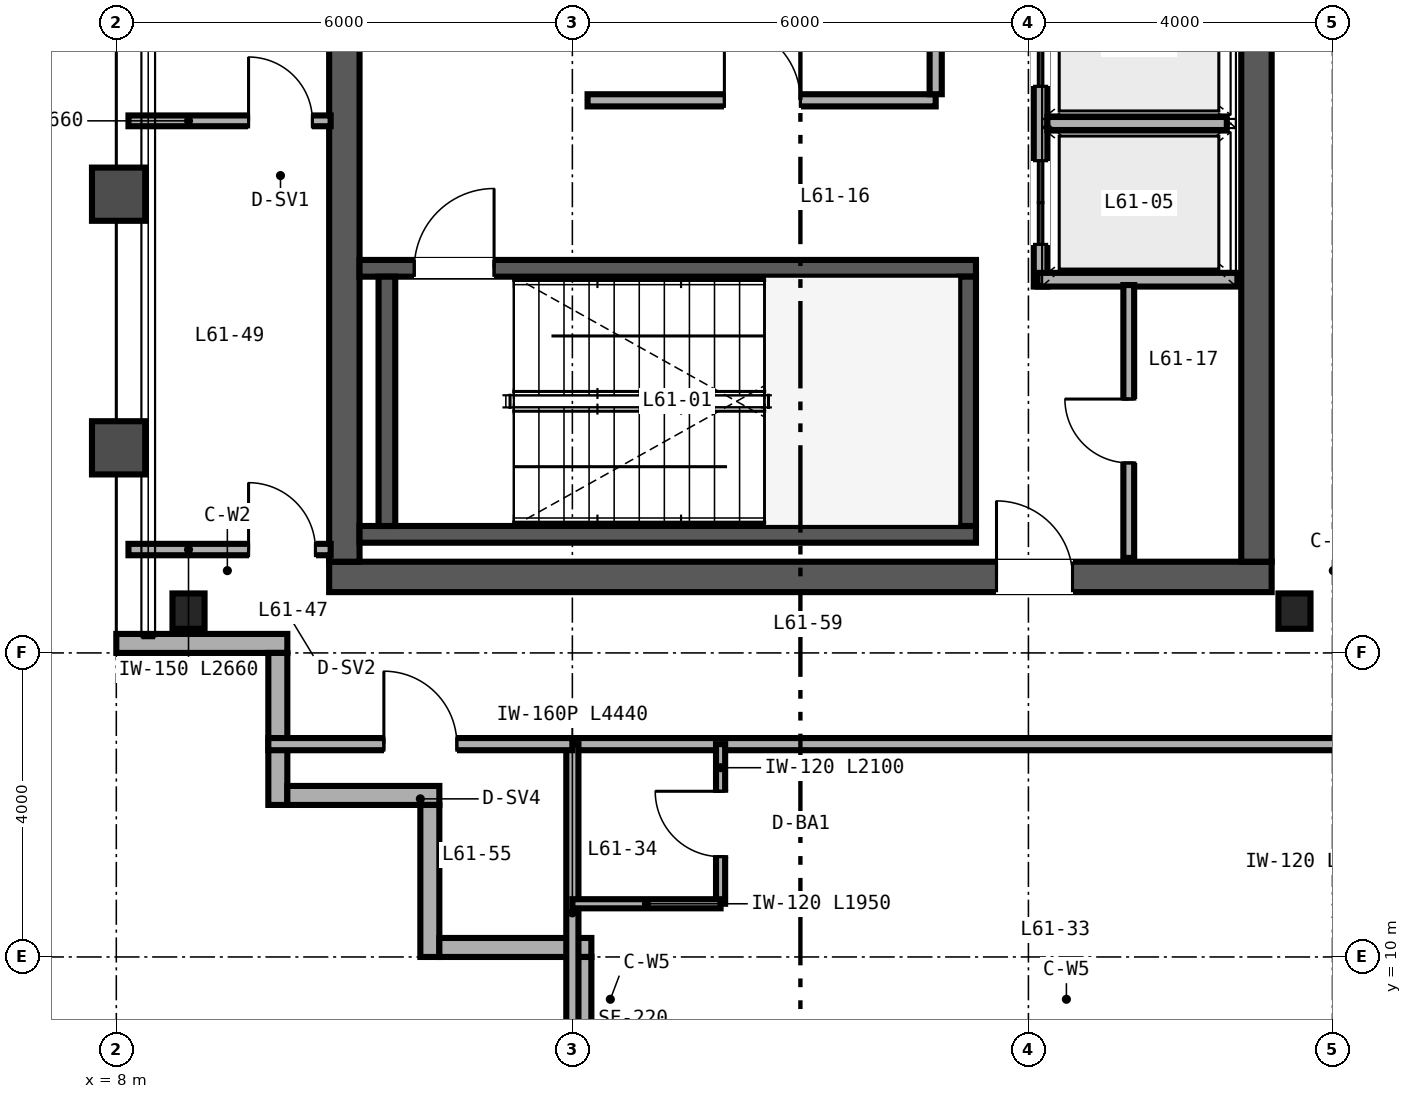
"""IFC4 building model, lengths in metres.
Left out: names, types, materials, properties, quantities, classifications, styles, units other than length and angle.
Written with IfcOpenShell. Run it as: python <this file> out.ifc"""

import sys

from ifc_helpers import new_model, si_unit, direction, frame, frame_2d, origin, origin_2d, place, context, subcontext, project, spatial, rectangle, i_section, extrude, source, transform, mapped, element, fill, save


model = new_model("IFC4")
c1 = context("Model", 3, precision=1e-05, world=origin(), true_north=direction((0.0, 1.0)))
c2 = subcontext(c1, "Body", "Model", "MODEL_VIEW")
j1 = project(units=[si_unit("LENGTHUNIT", "METRE"), si_unit("PLANEANGLEUNIT", "RADIAN")], contexts=[c1])
p1 = place(None, origin())
s1 = spatial("IfcSite", under=j1, at=p1, CompositionType="ELEMENT")
p2 = place(p1, origin())
s2 = spatial("IfcBuilding", under=s1, at=p2, CompositionType="ELEMENT")
p3 = place(p2, frame((0.0, 0.0, 243.6)))
s3 = spatial("IfcBuildingStorey", under=s2, at=p3, CompositionType="ELEMENT", Elevation=243.6)
p4 = place(p3, frame((10.8, 15.0, 0.0), z_axis=(0.0, 0.0, 1.0), x_axis=(1.0, 0.0, 0.0)))
e1 = element("IfcWall", 1, at=p4, inside=s3, PredefinedType="SHEAR", context=c2, shape_type="SweptSolid", body=[
    extrude(rectangle(XDim=12.4, YDim=0.4, at=frame_2d((6.2, 0.0))), origin(), (0.0, 0.0, 1.0), 3.28),
])
p5 = place(p4, frame((8.78, 0.0, 0.0)))
e2 = element("IfcOpeningElement", 2, at=p5, cuts=e1, PredefinedType="OPENING", context=c2, shape_type="SweptSolid", body=[
    extrude(rectangle(XDim=1.0, YDim=2.15, at=frame_2d((0.5, 1.075))), frame((0.0, 0.21, 0.0), z_axis=(0.0, -1.0, 0.0), x_axis=(1.0, 0.0, 0.0)), (0.0, 0.0, 1.0), 0.42),
])
for number, where, z_axis, x_axis in (
    (3, (11.0, 15.2, 0.0), (0.0, 0.0, 1.0), (0.0, 1.0, 0.0)),
    (4, (23.0, 15.2, 0.0), (0.0, 0.0, 1.0), (0.0, 1.0, 0.0)),
):
    element("IfcWall", number, at=place(p3, frame(where, z_axis=z_axis, x_axis=x_axis)), inside=s3, PredefinedType="SHEAR", context=c2, shape_type="SweptSolid", body=[
        extrude(rectangle(XDim=21.6, YDim=0.4, at=frame_2d((10.8, 0.0))), origin(), (0.0, 0.0, 1.0), 3.28),
    ])
p6 = place(p3, frame((11.2, 15.56, 0.0), z_axis=(0.0, 0.0, 1.0), x_axis=(1.0, 0.0, 0.0)))
e5 = element("IfcWall", 5, at=p6, inside=s3, PredefinedType="SHEAR", context=c2, shape_type="SweptSolid", body=[
    extrude(rectangle(XDim=8.11, YDim=0.22, at=frame_2d((4.055, 0.0))), origin(), (0.0, 0.0, 1.0), 3.4),
])
p7 = place(p3, frame((11.2, 19.06, 0.0), z_axis=(0.0, 0.0, 1.0), x_axis=(1.0, 0.0, 0.0)))
e6 = element("IfcWall", 6, at=p7, inside=s3, PredefinedType="SHEAR", context=c2, shape_type="SweptSolid", body=[
    extrude(rectangle(XDim=8.11, YDim=0.22, at=frame_2d((4.055, 0.0))), origin(), (0.0, 0.0, 1.0), 3.4),
])
p8 = place(p7, frame((0.72, 0.0, 0.0)))
e7 = element("IfcOpeningElement", 7, at=p8, cuts=e6, PredefinedType="OPENING", context=c2, shape_type="SweptSolid", body=[
    extrude(rectangle(XDim=1.05, YDim=2.15, at=frame_2d((0.525, 1.075))), frame((0.0, 0.12, 0.0), z_axis=(0.0, -1.0, 0.0), x_axis=(1.0, 0.0, 0.0)), (0.0, 0.0, 1.0), 0.24),
])
for number, where, z_axis, x_axis in (
    (8, (11.56, 15.67, 0.0), (0.0, 0.0, 1.0), (0.0, 1.0, 0.0)),
    (9, (19.2, 15.67, 0.0), (0.0, 0.0, 1.0), (0.0, 1.0, 0.0)),
):
    element("IfcWall", number, at=place(p3, frame(where, z_axis=z_axis, x_axis=x_axis)), inside=s3, PredefinedType="SHEAR", context=c2, shape_type="SweptSolid", body=[
        extrude(rectangle(XDim=3.28, YDim=0.22, at=frame_2d((1.64, 0.0))), origin(), (0.0, 0.0, 1.0), 3.4),
    ])
m1 = source(origin(), c2, "Body", "SweptSolid", [
    extrude(i_section(OverallWidth=0.422, OverallDepth=0.465, WebThickness=0.045, FlangeThickness=0.073, FilletRadius=0.025, at=origin_2d()), origin(), (0.0, 0.0, 1.0), 3.28),
])
for number, where, z_axis, x_axis in (
    (10, (8.95, 14.55, 0.0), (0.0, 0.0, 1.0), (1.0, 0.0, 0.0)),
    (11, (23.5, 14.55, 0.0), (0.0, 0.0, 1.0), (1.0, 0.0, 0.0)),
):
    element("IfcColumn", number, at=place(p3, frame(where, z_axis=z_axis, x_axis=x_axis)), inside=s3, PredefinedType="COLUMN", context=c2, shape_type="MappedRepresentation", body=[
        mapped(m1, transform((0.0, 0.0, 0.0), scale=1.0)),
    ])
p9 = place(p3, frame((8.0, 14.125, 0.0), z_axis=(0.0, 0.0, 1.0), x_axis=(1.0, 0.0, 0.0)))
e12 = element("IfcWall", 12, at=p9, inside=s3, PredefinedType="SOLIDWALL", context=c2, shape_type="SweptSolid", body=[
    extrude(rectangle(XDim=2.25, YDim=0.25, at=frame_2d((1.125, 0.0))), origin(), (0.0, 0.0, 1.0), 3.28),
])
for number, where, z_axis, x_axis in (
    (13, (10.125, 14.0, 0.0), (0.0, 0.0, 1.0), (0.0, -1.0, 0.0)),
    (14, (10.25, 12.125, 0.0), (0.0, 0.0, 1.0), (1.0, 0.0, 0.0)),
    (15, (12.125, 12.0, 0.0), (0.0, 0.0, 1.0), (0.0, -1.0, 0.0)),
    (16, (12.25, 10.125, 0.0), (0.0, 0.0, 1.0), (1.0, 0.0, 0.0)),
):
    element("IfcWall", number, at=place(p3, frame(where, z_axis=z_axis, x_axis=x_axis)), inside=s3, PredefinedType="SOLIDWALL", context=c2, shape_type="SweptSolid", body=[
        extrude(rectangle(XDim=2.0, YDim=0.25, at=frame_2d((1.0, 0.0))), origin(), (0.0, 0.0, 1.0), 3.28),
    ])
p10 = place(p3, frame((14.125, 10.0, 0.0), z_axis=(0.0, 0.0, 1.0), x_axis=(0.0, -1.0, 0.0)))
e17 = element("IfcWall", 17, at=p10, inside=s3, PredefinedType="SOLIDWALL", context=c2, shape_type="SweptSolid", body=[
    extrude(rectangle(XDim=2.0, YDim=0.25, at=frame_2d((1.0, 0.0))), origin(), (0.0, 0.0, 1.0), 2.587),
])
p11 = place(p3, frame((20.16, 18.82, 0.0), z_axis=(0.0, 0.0, 1.0), x_axis=(0.0, 1.0, 0.0)))
e18 = element("IfcWall", 18, at=p11, inside=s3, PredefinedType="SOLIDWALL", context=c2, shape_type="SweptSolid", body=[
    extrude(rectangle(XDim=6.32, YDim=0.18, at=frame_2d((3.16, 0.0))), origin(), (0.0, 0.0, 1.0), 2.38),
])
p12 = place(p11, frame((0.555, 0.0, 0.0)))
e19 = element("IfcOpeningElement", 19, at=p12, cuts=e18, PredefinedType="OPENING", context=c2, shape_type="SweptSolid", body=[
    extrude(rectangle(XDim=1.1, YDim=2.2, at=frame_2d((0.55, 1.1))), frame((0.0, 0.1, 0.0), z_axis=(0.0, -1.0, 0.0), x_axis=(1.0, 0.0, 0.0)), (0.0, 0.0, 1.0), 0.2),
])
p13 = place(p11, frame((2.635, 0.0, 0.0)))
e20 = element("IfcOpeningElement", 20, at=p13, cuts=e18, PredefinedType="OPENING", context=c2, shape_type="SweptSolid", body=[
    extrude(rectangle(XDim=1.1, YDim=2.2, at=frame_2d((0.55, 1.1))), frame((0.0, 0.1, 0.0), z_axis=(0.0, -1.0, 0.0), x_axis=(1.0, 0.0, 0.0)), (0.0, 0.0, 1.0), 0.2),
])
p14 = place(p11, frame((4.69, 0.0, 0.0)))
e21 = element("IfcOpeningElement", 21, at=p14, cuts=e18, PredefinedType="OPENING", context=c2, shape_type="SweptSolid", body=[
    extrude(rectangle(XDim=1.1, YDim=2.2, at=frame_2d((0.55, 1.1))), frame((0.0, 0.1, 0.0), z_axis=(0.0, -1.0, 0.0), x_axis=(1.0, 0.0, 0.0)), (0.0, 0.0, 1.0), 0.2),
])
p15 = place(p3, frame((20.12, 18.91, 0.0), z_axis=(0.0, 0.0, 1.0), x_axis=(1.0, 0.0, 0.0)))
e22 = element("IfcWall", 22, at=p15, inside=s3, PredefinedType="SOLIDWALL", context=c2, shape_type="SweptSolid", body=[
    extrude(rectangle(XDim=2.63, YDim=0.18, at=frame_2d((1.315, 0.0))), origin(), (0.0, 0.0, 1.0), 3.28),
])
p16 = place(p3, frame((20.25, 20.965, 0.0), z_axis=(0.0, 0.0, 1.0), x_axis=(1.0, 0.0, 0.0)))
e23 = element("IfcWall", 23, at=p16, inside=s3, PredefinedType="SOLIDWALL", context=c2, shape_type="SweptSolid", body=[
    extrude(rectangle(XDim=2.36, YDim=0.18, at=frame_2d((1.18, 0.0))), origin(), (0.0, 0.0, 1.0), 2.38),
])
p17 = place(p3, frame((14.2, 21.27, 0.0), z_axis=(0.0, 0.0, 1.0), x_axis=(1.0, 0.0, 0.0)))
e24 = element("IfcWall", 24, at=p17, inside=s3, PredefinedType="PARTITIONING", context=c2, shape_type="SweptSolid", body=[
    extrude(rectangle(XDim=4.58, YDim=0.16, at=frame_2d((2.29, 0.0))), origin(), (0.0, 0.0, 1.0), 3.28),
])
p18 = place(p17, frame((1.8, 0.0, 0.0)))
e25 = element("IfcOpeningElement", 25, at=p18, cuts=e24, PredefinedType="OPENING", context=c2, shape_type="SweptSolid", body=[
    extrude(rectangle(XDim=1.0, YDim=2.15, at=frame_2d((0.5, 1.075))), frame((0.0, 0.09, 0.0), z_axis=(0.0, -1.0, 0.0), x_axis=(1.0, 0.0, 0.0)), (0.0, 0.0, 1.0), 0.18),
])
p19 = place(p3, frame((18.78, 21.35, 0.0), z_axis=(0.0, 0.0, 1.0), x_axis=(0.0, 1.0, 0.0)))
e26 = element("IfcWall", 26, at=p19, inside=s3, PredefinedType="PARTITIONING", context=c2, shape_type="SweptSolid", body=[
    extrude(rectangle(XDim=3.81, YDim=0.16, at=frame_2d((1.905, 0.0))), origin(), (0.0, 0.0, 1.0), 3.28),
])
p20 = place(p3, frame((21.32, 15.25, 0.0), z_axis=(0.0, 0.0, 1.0), x_axis=(0.0, 1.0, 0.0)))
e27 = element("IfcWall", 27, at=p20, inside=s3, PredefinedType="PARTITIONING", context=c2, shape_type="SweptSolid", body=[
    extrude(rectangle(XDim=3.59, YDim=0.142, at=frame_2d((1.795, 0.0))), origin(), (0.0, 0.0, 1.0), 3.28),
])
p21 = place(p20, frame((1.25, 0.0, 0.0)))
e28 = element("IfcOpeningElement", 28, at=p21, cuts=e27, PredefinedType="OPENING", context=c2, shape_type="SweptSolid", body=[
    extrude(rectangle(XDim=0.84, YDim=2.1, at=frame_2d((0.42, 1.05))), frame((0.0, 0.081, 0.0), z_axis=(0.0, -1.0, 0.0), x_axis=(1.0, 0.0, 0.0)), (0.0, 0.0, 1.0), 0.162),
])
p22 = place(p3, frame((14.0, 12.8, 0.0), z_axis=(0.0, 0.0, 1.0), x_axis=(1.0, 0.0, 0.0)))
e29 = element("IfcWall", 29, at=p22, inside=s3, PredefinedType="PARTITIONING", context=c2, shape_type="SweptSolid", body=[
    extrude(rectangle(XDim=36.0, YDim=0.16, at=frame_2d((18.0, 0.0))), origin(), (0.0, 0.0, 1.0), 2.823),
])
p23 = place(p22, frame((10.7, 0.0, 0.0)))
e30 = element("IfcOpeningElement", 30, at=p23, cuts=e29, PredefinedType="OPENING", context=c2, shape_type="SweptSolid", body=[
    extrude(rectangle(XDim=0.98, YDim=2.2, at=frame_2d((0.49, 1.1))), frame((0.0, 0.09, 0.0), z_axis=(0.0, -1.0, 0.0), x_axis=(1.0, 0.0, 0.0)), (0.0, 0.0, 1.0), 0.18),
])
p24 = place(p22, frame((22.7, 0.0, 0.0)))
e31 = element("IfcOpeningElement", 31, at=p24, cuts=e29, PredefinedType="OPENING", context=c2, shape_type="SweptSolid", body=[
    extrude(rectangle(XDim=0.98, YDim=2.2, at=frame_2d((0.49, 1.1))), frame((0.0, 0.09, 0.0), z_axis=(0.0, -1.0, 0.0), x_axis=(1.0, 0.0, 0.0)), (0.0, 0.0, 1.0), 0.18),
])
p25 = place(p22, frame((34.7, 0.0, 0.0)))
e32 = element("IfcOpeningElement", 32, at=p25, cuts=e29, PredefinedType="OPENING", context=c2, shape_type="SweptSolid", body=[
    extrude(rectangle(XDim=0.98, YDim=2.2, at=frame_2d((0.49, 1.1))), frame((0.0, 0.09, 0.0), z_axis=(0.0, -1.0, 0.0), x_axis=(1.0, 0.0, 0.0)), (0.0, 0.0, 1.0), 0.18),
])
p26 = place(p3, frame((14.0, 8.36, 0.0), z_axis=(0.0, 0.0, 1.0), x_axis=(0.0, 1.0, 0.0)))
e33 = element("IfcWall", 33, at=p26, inside=s3, PredefinedType="PARTITIONING", context=c2, shape_type="SweptSolid", body=[
    extrude(rectangle(XDim=4.44, YDim=0.16, at=frame_2d((2.22, 0.0))), origin(), (0.0, 0.0, 1.0), 2.587),
])
p27 = place(p3, frame((15.95, 10.7, 0.0), z_axis=(0.0, 0.0, 1.0), x_axis=(0.0, 1.0, 0.0)))
e34 = element("IfcWall", 34, at=p27, inside=s3, PredefinedType="PARTITIONING", context=c2, shape_type="SweptSolid", body=[
    extrude(rectangle(XDim=2.1, YDim=0.12, at=frame_2d((1.05, 0.0))), origin(), (0.0, 0.0, 1.0), 3.28),
])
p28 = place(p27, frame((0.62, 0.0, 0.0)))
e35 = element("IfcOpeningElement", 35, at=p28, cuts=e34, PredefinedType="OPENING", context=c2, shape_type="SweptSolid", body=[
    extrude(rectangle(XDim=0.86, YDim=2.1, at=frame_2d((0.43, 1.05))), frame((0.0, 0.07, 0.0), z_axis=(0.0, -1.0, 0.0), x_axis=(1.0, 0.0, 0.0)), (0.0, 0.0, 1.0), 0.14),
])
p29 = place(p3, frame((14.0, 10.7, 0.0), z_axis=(0.0, 0.0, 1.0), x_axis=(1.0, 0.0, 0.0)))
e36 = element("IfcWall", 36, at=p29, inside=s3, PredefinedType="PARTITIONING", context=c2, shape_type="SweptSolid", body=[
    extrude(rectangle(XDim=1.95, YDim=0.12, at=frame_2d((0.975, 0.0))), origin(), (0.0, 0.0, 1.0), 3.28),
])
p30 = place(p3, frame((8.16, 15.36, 0.0), z_axis=(0.0, 0.0, 1.0), x_axis=(1.0, 0.0, 0.0)))
e37 = element("IfcWall", 37, at=p30, inside=s3, PredefinedType="PARTITIONING", context=c2, shape_type="SweptSolid", body=[
    extrude(rectangle(XDim=2.66, YDim=0.15, at=frame_2d((1.33, 0.0))), origin(), (0.0, 0.0, 1.0), 2.501),
])
p31 = place(p30, frame((1.58, 0.0, 0.0)))
e38 = element("IfcOpeningElement", 38, at=p31, cuts=e37, PredefinedType="OPENING", context=c2, shape_type="SweptSolid", body=[
    extrude(rectangle(XDim=0.88, YDim=2.15, at=frame_2d((0.44, 1.075))), frame((0.0, 0.085, 0.0), z_axis=(0.0, -1.0, 0.0), x_axis=(1.0, 0.0, 0.0)), (0.0, 0.0, 1.0), 0.17),
])
p32 = place(p3, frame((8.16, 21.0, 0.0), z_axis=(0.0, 0.0, 1.0), x_axis=(1.0, 0.0, 0.0)))
e39 = element("IfcWall", 39, at=p32, inside=s3, PredefinedType="PARTITIONING", context=c2, shape_type="SweptSolid", body=[
    extrude(rectangle(XDim=2.66, YDim=0.142, at=frame_2d((1.33, 0.0))), origin(), (0.0, 0.0, 1.0), 2.38),
])
p33 = place(p32, frame((1.58, 0.0, 0.0)))
e40 = element("IfcOpeningElement", 40, at=p33, cuts=e39, PredefinedType="OPENING", context=c2, shape_type="SweptSolid", body=[
    extrude(rectangle(XDim=0.84, YDim=2.1, at=frame_2d((0.42, 1.05))), frame((0.0, 0.081, 0.0), z_axis=(0.0, -1.0, 0.0), x_axis=(1.0, 0.0, 0.0)), (0.0, 0.0, 1.0), 0.162),
])
p34 = place(p3, frame((10.0, 12.8, 0.0), z_axis=(0.0, 0.0, 1.0), x_axis=(1.0, 0.0, 0.0)))
e41 = element("IfcWall", 41, at=p34, inside=s3, PredefinedType="PARTITIONING", context=c2, shape_type="SweptSolid", body=[
    extrude(rectangle(XDim=4.0, YDim=0.16, at=frame_2d((2.0, 0.0))), origin(), (0.0, 0.0, 1.0), 3.28),
])
p35 = place(p34, frame((1.52, 0.0, 0.0)))
e42 = element("IfcOpeningElement", 42, at=p35, cuts=e41, PredefinedType="OPENING", context=c2, shape_type="SweptSolid", body=[
    extrude(rectangle(XDim=0.96, YDim=2.15, at=frame_2d((0.48, 1.075))), frame((0.0, 0.09, 0.0), z_axis=(0.0, -1.0, 0.0), x_axis=(1.0, 0.0, 0.0)), (0.0, 0.0, 1.0), 0.18),
])
m2 = source(origin(), c2, "Body", "SweptSolid", [
    extrude(rectangle(XDim=1.05, YDim=2.15, at=frame_2d((0.525, 1.075))), frame((0.0, 0.025, 0.0), z_axis=(0.0, -1.0, 0.0), x_axis=(1.0, 0.0, 0.0)), (0.0, 0.0, 1.0), 0.05),
])
p36 = place(p8, origin())
e43 = element("IfcDoor", 43, at=p36, inside=s3, OperationType="SINGLE_SWING_RIGHT", PredefinedType="DOOR", context=c2, shape_type="MappedRepresentation", body=[
    mapped(m2, transform((0.0, 0.0, 0.0), scale=1.0)),
])
fill(e7, e43)
m3 = source(origin(), c2, "Body", "SweptSolid", [
    extrude(rectangle(XDim=1.1, YDim=2.2, at=frame_2d((0.55, 1.1))), frame((0.0, 0.025, 0.0), z_axis=(0.0, -1.0, 0.0), x_axis=(1.0, 0.0, 0.0)), (0.0, 0.0, 1.0), 0.05),
])
p37 = place(p12, origin())
e44 = element("IfcDoor", 44, at=p37, inside=s3, OperationType="DOUBLE_DOOR_SLIDING", PredefinedType="DOOR", context=c2, shape_type="MappedRepresentation", body=[
    mapped(m3, transform((0.0, 0.0, 0.0), scale=1.0)),
])
fill(e19, e44)
p38 = place(p13, origin())
e45 = element("IfcDoor", 45, at=p38, inside=s3, OperationType="DOUBLE_DOOR_SLIDING", PredefinedType="DOOR", context=c2, shape_type="MappedRepresentation", body=[
    mapped(m3, transform((0.0, 0.0, 0.0), scale=1.0)),
])
fill(e20, e45)
m4 = source(origin(), c2, "Body", "SweptSolid", [
    extrude(rectangle(XDim=1.0, YDim=2.15, at=frame_2d((0.5, 1.075))), frame((0.0, 0.025, 0.0), z_axis=(0.0, -1.0, 0.0), x_axis=(1.0, 0.0, 0.0)), (0.0, 0.0, 1.0), 0.05),
])
p39 = place(p18, origin())
e46 = element("IfcDoor", 46, at=p39, inside=s3, OperationType="SINGLE_SWING_LEFT", PredefinedType="DOOR", context=c2, shape_type="MappedRepresentation", body=[
    mapped(m4, transform((0.0, 0.0, 0.0), scale=1.0)),
])
fill(e25, e46)
m5 = source(origin(), c2, "Body", "SweptSolid", [
    extrude(rectangle(XDim=0.84, YDim=2.1, at=frame_2d((0.42, 1.05))), frame((0.0, 0.025, 0.0), z_axis=(0.0, -1.0, 0.0), x_axis=(1.0, 0.0, 0.0)), (0.0, 0.0, 1.0), 0.05),
])
p40 = place(p21, origin())
e47 = element("IfcDoor", 47, at=p40, inside=s3, OperationType="SINGLE_SWING_RIGHT", PredefinedType="DOOR", context=c2, shape_type="MappedRepresentation", body=[
    mapped(m5, transform((0.0, 0.0, 0.0), scale=1.0)),
])
fill(e28, e47)
p41 = place(p5, origin())
e48 = element("IfcDoor", 48, at=p41, inside=s3, OperationType="SINGLE_SWING_LEFT", PredefinedType="DOOR", context=c2, shape_type="MappedRepresentation", body=[
    mapped(m4, transform((0.0, 0.0, 0.0), scale=1.0)),
])
fill(e2, e48)
m6 = source(origin(), c2, "Body", "SweptSolid", [
    extrude(rectangle(XDim=0.86, YDim=2.1, at=frame_2d((0.43, 1.05))), frame((0.0, 0.025, 0.0), z_axis=(0.0, -1.0, 0.0), x_axis=(1.0, 0.0, 0.0)), (0.0, 0.0, 1.0), 0.05),
])
p42 = place(p28, origin())
e49 = element("IfcDoor", 49, at=p42, inside=s3, OperationType="SINGLE_SWING_RIGHT", PredefinedType="DOOR", context=c2, shape_type="MappedRepresentation", body=[
    mapped(m6, transform((0.0, 0.0, 0.0), scale=1.0)),
])
fill(e35, e49)
m7 = source(origin(), c2, "Body", "SweptSolid", [
    extrude(rectangle(XDim=0.88, YDim=2.15, at=frame_2d((0.44, 1.075))), frame((0.0, 0.025, 0.0), z_axis=(0.0, -1.0, 0.0), x_axis=(1.0, 0.0, 0.0)), (0.0, 0.0, 1.0), 0.05),
])
p43 = place(p31, origin())
e50 = element("IfcDoor", 50, at=p43, inside=s3, OperationType="SINGLE_SWING_LEFT", PredefinedType="DOOR", context=c2, shape_type="MappedRepresentation", body=[
    mapped(m7, transform((0.0, 0.0, 0.0), scale=1.0)),
])
fill(e38, e50)
p44 = place(p33, origin())
e51 = element("IfcDoor", 51, at=p44, inside=s3, OperationType="SINGLE_SWING_LEFT", PredefinedType="DOOR", context=c2, shape_type="MappedRepresentation", body=[
    mapped(m5, transform((0.0, 0.0, 0.0), scale=1.0)),
])
fill(e40, e51)
m8 = source(origin(), c2, "Body", "SweptSolid", [
    extrude(rectangle(XDim=0.96, YDim=2.15, at=frame_2d((0.48, 1.075))), frame((0.0, 0.025, 0.0), z_axis=(0.0, -1.0, 0.0), x_axis=(1.0, 0.0, 0.0)), (0.0, 0.0, 1.0), 0.05),
])
p45 = place(p35, origin())
e52 = element("IfcDoor", 52, at=p45, inside=s3, OperationType="SINGLE_SWING_LEFT", PredefinedType="DOOR", context=c2, shape_type="MappedRepresentation", body=[
    mapped(m8, transform((0.0, 0.0, 0.0), scale=1.0)),
])
fill(e42, e52)
save(model, sys.argv[1])
